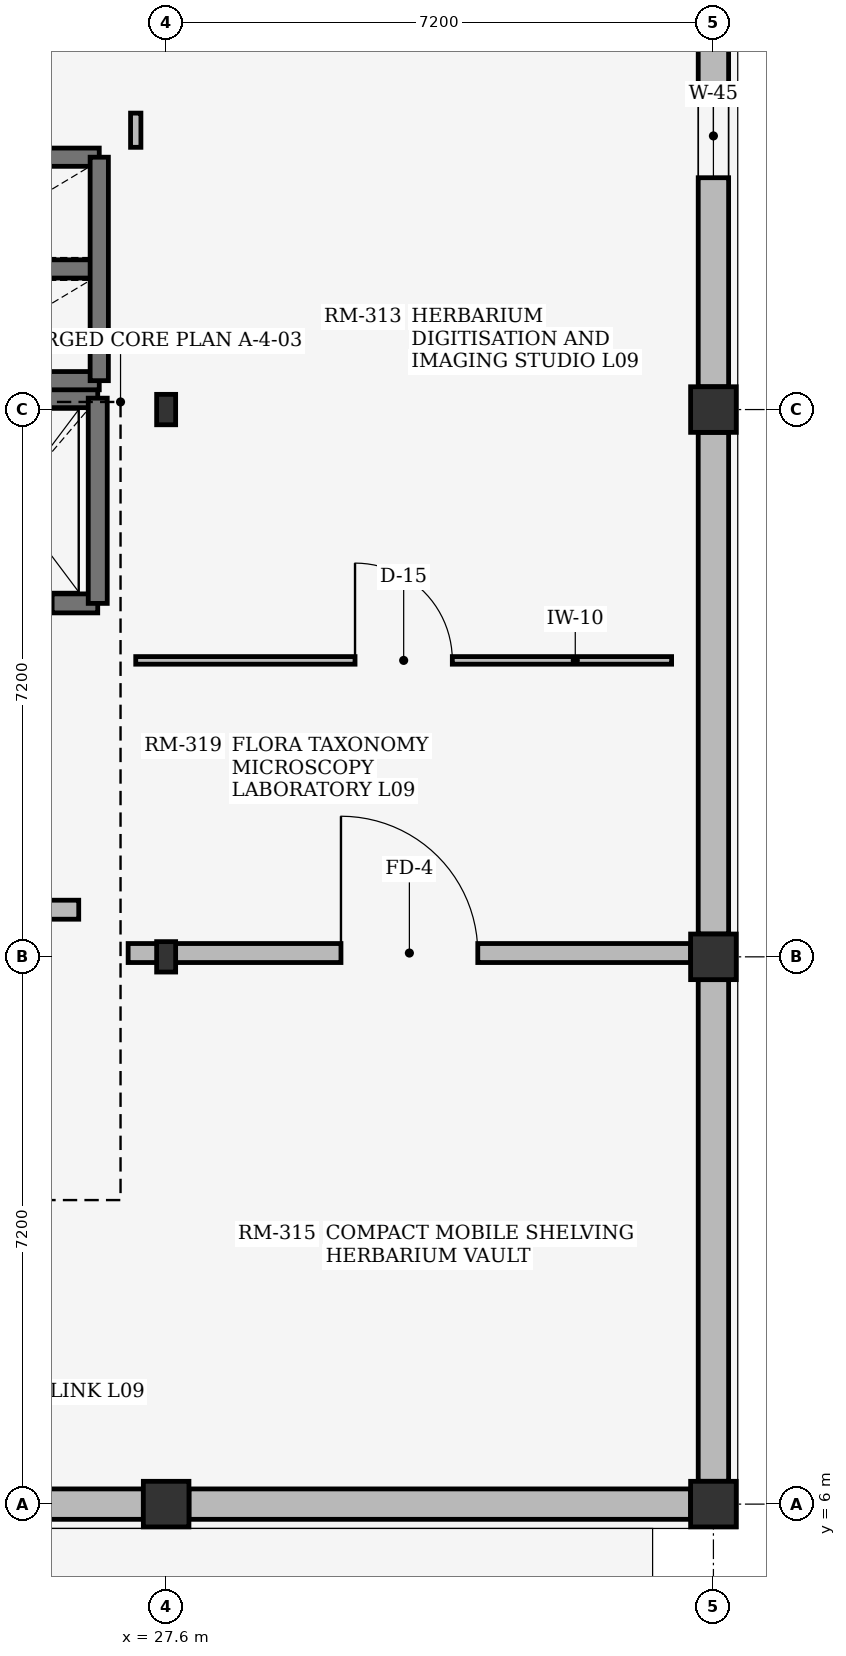
"""IFC4 building model, lengths in metres.
Left out: names, types, materials, properties, quantities, classifications, styles, units other than length and angle.
Written with IfcOpenShell. Run it as: python <this file> out.ifc"""

import sys

from ifc_helpers import new_model, si_unit, direction, frame, frame_2d, origin, origin_2d, place, context, subcontext, project, spatial, rectangle, i_section, extrude, element, fill, save


model = new_model("IFC4")
c1 = context("Model", 3, precision=1e-05, world=origin(), true_north=direction((0.0, 1.0)))
c2 = subcontext(c1, "Body", "Model", "MODEL_VIEW")
j1 = project(units=[si_unit("LENGTHUNIT", "METRE"), si_unit("PLANEANGLEUNIT", "RADIAN")], contexts=[c1])
p1 = place(None, origin())
s1 = spatial("IfcSite", under=j1, at=p1, CompositionType="ELEMENT")
p2 = place(p1, origin())
s2 = spatial("IfcBuilding", under=s1, at=p2, CompositionType="ELEMENT")
p3 = place(p2, frame((0.0, 0.0, 36.6)))
s3 = spatial("IfcBuildingStorey", under=s2, at=p3, CompositionType="ELEMENT", Elevation=36.6)
p4 = place(p3, frame((27.6, 6.0, 0.0), z_axis=(0.0, 0.0, 1.0), x_axis=(1.0, 0.0, 0.0)))
e1 = element("IfcColumn", 1, at=p4, inside=s3, PredefinedType="COLUMN", context=c2, shape_type="SweptSolid", body=[
    extrude(rectangle(XDim=0.6, YDim=0.6, at=origin_2d()), origin(), (0.0, 0.0, 1.0), 3.62),
])
for number, where, z_axis, x_axis in (
    (2, (27.6, 13.2, 0.0), (0.0, 0.0, 1.0), (1.0, 0.0, 0.0)),
    (3, (27.6, 20.4, 0.0), (0.0, 0.0, 1.0), (1.0, 0.0, 0.0)),
):
    element("IfcColumn", number, at=place(p3, frame(where, z_axis=z_axis, x_axis=x_axis)), inside=s3, PredefinedType="COLUMN", context=c2, shape_type="SweptSolid", body=[
        extrude(i_section(OverallWidth=0.25, OverallDepth=0.4, WebThickness=0.01, FlangeThickness=0.013, at=origin_2d()), origin(), (0.0, 0.0, 1.0), 3.62),
    ])
for number, where, z_axis, x_axis in (
    (4, (34.8, 6.0, 0.0), (0.0, 0.0, 1.0), (1.0, 0.0, 0.0)),
    (5, (34.8, 13.2, 0.0), (0.0, 0.0, 1.0), (1.0, 0.0, 0.0)),
    (6, (34.8, 20.4, 0.0), (0.0, 0.0, 1.0), (1.0, 0.0, 0.0)),
):
    element("IfcColumn", number, at=place(p3, frame(where, z_axis=z_axis, x_axis=x_axis)), inside=s3, PredefinedType="COLUMN", context=c2, shape_type="SweptSolid", body=[
        extrude(rectangle(XDim=0.6, YDim=0.6, at=origin_2d()), origin(), (0.0, 0.0, 1.0), 3.62),
    ])
for number, where, z_axis, x_axis in (
    (7, (20.7, 6.0, 0.0), (0.0, 0.0, 1.0), (1.0, 0.0, 0.0)),
    (8, (27.9, 6.0, 0.0), (0.0, 0.0, 1.0), (1.0, 0.0, 0.0)),
):
    element("IfcWall", number, at=place(p3, frame(where, z_axis=z_axis, x_axis=x_axis)), inside=s3, PredefinedType="STANDARD", context=c2, shape_type="SweptSolid", body=[
        extrude(rectangle(XDim=6.6, YDim=0.4, at=frame_2d((3.3, 0.0))), origin(), (0.0, 0.0, 1.0), 3.1),
    ])
p5 = place(p3, frame((34.8, 6.3, 0.0), z_axis=(0.0, 0.0, 1.0), x_axis=(0.0, 1.0, 0.0)))
e9 = element("IfcWall", 9, at=p5, inside=s3, PredefinedType="STANDARD", context=c2, shape_type="SweptSolid", body=[
    extrude(rectangle(XDim=6.6, YDim=0.4, at=frame_2d((3.3, 0.0))), origin(), (0.0, 0.0, 1.0), 3.1),
])
p6 = place(p3, frame((34.8, 13.5, 0.0), z_axis=(0.0, 0.0, 1.0), x_axis=(0.0, 1.0, 0.0)))
e10 = element("IfcWall", 10, at=p6, inside=s3, PredefinedType="STANDARD", context=c2, shape_type="SweptSolid", body=[
    extrude(rectangle(XDim=6.6, YDim=0.4, at=frame_2d((3.3, 0.0))), origin(), (0.0, 0.0, 1.0), 3.1),
])
p7 = place(p3, frame((34.8, 20.7, 0.0), z_axis=(0.0, 0.0, 1.0), x_axis=(0.0, 1.0, 0.0)))
e11 = element("IfcWall", 11, at=p7, inside=s3, PredefinedType="STANDARD", context=c2, shape_type="SweptSolid", body=[
    extrude(rectangle(XDim=6.6, YDim=0.4, at=frame_2d((3.3, 0.0))), origin(), (0.0, 0.0, 1.0), 3.1),
])
p8 = place(p7, frame((2.75, 0.0, 0.75)))
e12 = element("IfcOpeningElement", 12, at=p8, cuts=e11, PredefinedType="OPENING", context=c2, shape_type="SweptSolid", body=[
    extrude(rectangle(XDim=1.1, YDim=1.25, at=frame_2d((0.55, 0.625))), frame((0.0, 0.21, 0.0), z_axis=(0.0, -1.0, 0.0), x_axis=(1.0, 0.0, 0.0)), (0.0, 0.0, 1.0), 0.42),
])
p9 = place(p3, frame((24.4, 17.85, 0.0), z_axis=(0.0, 0.0, 1.0), x_axis=(1.0, 0.0, 0.0)))
e13 = element("IfcWall", 13, at=p9, inside=s3, PredefinedType="SHEAR", context=c2, shape_type="SweptSolid", body=[
    extrude(rectangle(XDim=2.3, YDim=0.25, at=frame_2d((1.15, 0.0))), origin(), (0.0, 0.0, 1.0), 3.62),
])
p10 = place(p9, frame((0.6, 0.0, 0.0)))
e14 = element("IfcOpeningElement", 14, at=p10, cuts=e13, PredefinedType="OPENING", context=c2, shape_type="SweptSolid", body=[
    extrude(rectangle(XDim=1.1, YDim=2.2, at=frame_2d((0.55, 1.1))), frame((0.0, 0.135, 0.0), z_axis=(0.0, -1.0, 0.0), x_axis=(1.0, 0.0, 0.0)), (0.0, 0.0, 1.0), 0.27),
])
p11 = place(p3, frame((24.4, 20.55, 0.0), z_axis=(0.0, 0.0, 1.0), x_axis=(1.0, 0.0, 0.0)))
e15 = element("IfcWall", 15, at=p11, inside=s3, PredefinedType="SHEAR", context=c2, shape_type="SweptSolid", body=[
    extrude(rectangle(XDim=2.3, YDim=0.25, at=frame_2d((1.15, 0.0))), origin(), (0.0, 0.0, 1.0), 3.62),
])
p12 = place(p3, frame((26.7, 17.85, 0.0), z_axis=(0.0, 0.0, 1.0), x_axis=(0.0, 1.0, 0.0)))
e16 = element("IfcWall", 16, at=p12, inside=s3, PredefinedType="SHEAR", context=c2, shape_type="SweptSolid", body=[
    extrude(rectangle(XDim=2.7, YDim=0.25, at=frame_2d((1.35, 0.0))), origin(), (0.0, 0.0, 1.0), 3.62),
])
for number, where, z_axis, x_axis in (
    (17, (24.48, 20.78, 0.0), (0.0, 0.0, 1.0), (1.0, 0.0, 0.0)),
    (18, (24.48, 22.25, 0.0), (0.0, 0.0, 1.0), (1.0, 0.0, 0.0)),
    (19, (24.48, 23.72, 0.0), (0.0, 0.0, 1.0), (1.0, 0.0, 0.0)),
):
    element("IfcWall", number, at=place(p3, frame(where, z_axis=z_axis, x_axis=x_axis)), inside=s3, PredefinedType="SHEAR", context=c2, shape_type="SweptSolid", body=[
        extrude(rectangle(XDim=2.24, YDim=0.24, at=frame_2d((1.12, 0.0))), origin(), (0.0, 0.0, 1.0), 3.62),
    ])
p13 = place(p3, frame((26.72, 20.78, 0.0), z_axis=(0.0, 0.0, 1.0), x_axis=(0.0, 1.0, 0.0)))
e20 = element("IfcWall", 20, at=p13, inside=s3, PredefinedType="SHEAR", context=c2, shape_type="SweptSolid", body=[
    extrude(rectangle(XDim=2.94, YDim=0.24, at=frame_2d((1.47, 0.0))), origin(), (0.0, 0.0, 1.0), 3.62),
])
p14 = place(p3, frame((24.45, 13.82, 0.0), z_axis=(0.0, 0.0, 1.0), x_axis=(1.0, 0.0, 0.0)))
e21 = element("IfcWall", 21, at=p14, inside=s3, PredefinedType="SOLIDWALL", context=c2, shape_type="SweptSolid", body=[
    extrude(rectangle(XDim=2.0, YDim=0.25, at=frame_2d((1.0, 0.0))), origin(), (0.0, 0.0, 1.0), 3.6),
])
p15 = place(p3, frame((27.2, 17.1, 0.0), z_axis=(0.0, 0.0, 1.0), x_axis=(1.0, 0.0, 0.0)))
e22 = element("IfcWall", 22, at=p15, inside=s3, PredefinedType="PARTITIONING", context=c2, shape_type="SweptSolid", body=[
    extrude(rectangle(XDim=7.05, YDim=0.1, at=frame_2d((3.525, 0.0))), origin(), (0.0, 0.0, 1.0), 3.6),
])
p16 = place(p15, frame((2.885, 0.0, 0.0)))
e23 = element("IfcOpeningElement", 23, at=p16, cuts=e22, PredefinedType="OPENING", context=c2, shape_type="SweptSolid", body=[
    extrude(rectangle(XDim=1.28, YDim=2.15, at=frame_2d((0.64, 1.075))), frame((0.0, 0.06, 0.0), z_axis=(0.0, -1.0, 0.0), x_axis=(1.0, 0.0, 0.0)), (0.0, 0.0, 1.0), 0.12),
])
p17 = place(p3, frame((27.1, 13.25, 0.0), z_axis=(0.0, 0.0, 1.0), x_axis=(1.0, 0.0, 0.0)))
e24 = element("IfcWall", 24, at=p17, inside=s3, PredefinedType="SOLIDWALL", context=c2, shape_type="SweptSolid", body=[
    extrude(rectangle(XDim=7.4, YDim=0.25, at=frame_2d((3.7, 0.0))), origin(), (0.0, 0.0, 1.0), 3.11),
])
p18 = place(p17, frame((2.8, 0.0, 0.0)))
e25 = element("IfcOpeningElement", 25, at=p18, cuts=e24, PredefinedType="OPENING", context=c2, shape_type="SweptSolid", body=[
    extrude(rectangle(XDim=1.8, YDim=2.25, at=frame_2d((0.9, 1.125))), frame((0.0, 0.135, 0.0), z_axis=(0.0, -1.0, 0.0), x_axis=(1.0, 0.0, 0.0)), (0.0, 0.0, 1.0), 0.27),
])
p19 = place(p3, frame((27.2, 24.3, 0.0), z_axis=(0.0, 0.0, 1.0), x_axis=(0.0, -1.0, 0.0)))
e26 = element("IfcWall", 26, at=p19, inside=s3, PredefinedType="PARTITIONING", context=c2, shape_type="SweptSolid", body=[
    extrude(rectangle(XDim=0.45, YDim=0.136, at=frame_2d((0.225, 0.0))), origin(), (0.0, 0.0, 1.0), 3.6),
])
p20 = place(p8, origin())
e27 = element("IfcWindow", 27, at=p20, inside=s3, PartitioningType="SINGLE_PANEL", PredefinedType="WINDOW", context=c2, shape_type="SweptSolid", body=[
    extrude(rectangle(XDim=1.1, YDim=1.25, at=frame_2d((0.55, 0.625))), frame((0.0, 0.03, 0.0), z_axis=(0.0, -1.0, 0.0), x_axis=(1.0, 0.0, 0.0)), (0.0, 0.0, 1.0), 0.06),
])
fill(e12, e27)
p21 = place(p16, origin())
e28 = element("IfcDoor", 28, at=p21, inside=s3, OperationType="SINGLE_SWING_LEFT", PredefinedType="DOOR", context=c2, shape_type="SweptSolid", body=[
    extrude(rectangle(XDim=1.28, YDim=2.15, at=frame_2d((0.64, 1.075))), frame((0.0, 0.025, 0.0), z_axis=(0.0, -1.0, 0.0), x_axis=(1.0, 0.0, 0.0)), (0.0, 0.0, 1.0), 0.05),
])
fill(e23, e28)
p22 = place(p18, origin())
e29 = element("IfcDoor", 29, at=p22, inside=s3, OperationType="DOUBLE_DOOR_SINGLE_SWING", PredefinedType="DOOR", context=c2, shape_type="SweptSolid", body=[
    extrude(rectangle(XDim=1.8, YDim=2.25, at=frame_2d((0.9, 1.125))), frame((0.0, 0.025, 0.0), z_axis=(0.0, -1.0, 0.0), x_axis=(1.0, 0.0, 0.0)), (0.0, 0.0, 1.0), 0.05),
])
fill(e25, e29)
save(model, sys.argv[1])
